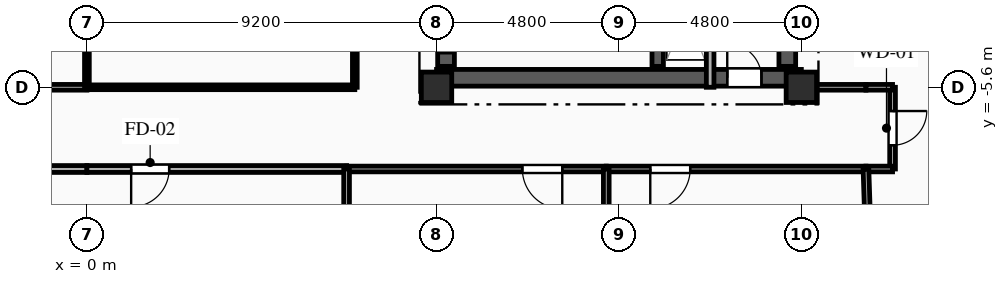
"""IFC4 building model, lengths in metres.
Left out: names, types, materials, properties, quantities, classifications, styles, units other than length and angle.
Written with IfcOpenShell. Run it as: python <this file> out.ifc"""

import sys

from ifc_helpers import new_model, si_unit, direction, frame, frame_2d, origin, origin_2d, place, context, subcontext, project, spatial, rectangle, extrude, element, fill, save


model = new_model("IFC4")
c1 = context("Model", 3, precision=1e-05, world=origin(), true_north=direction((0.0, 1.0)))
c2 = subcontext(c1, "Body", "Model", "MODEL_VIEW")
j1 = project(units=[si_unit("LENGTHUNIT", "METRE"), si_unit("PLANEANGLEUNIT", "RADIAN")], contexts=[c1])
p1 = place(None, origin())
s1 = spatial("IfcSite", under=j1, at=p1, CompositionType="ELEMENT")
p2 = place(p1, origin())
s2 = spatial("IfcBuilding", under=s1, at=p2, CompositionType="ELEMENT")
p3 = place(p2, frame((0.0, 0.0, 235.0)))
s3 = spatial("IfcBuildingStorey", under=s2, at=p3, CompositionType="ELEMENT", Elevation=235.0)
for number, where, z_axis, x_axis in (
    (1, (9.2, -5.6, 0.0), (0.0, 0.0, 1.0), (1.0, 0.0, 0.0)),
    (2, (18.8, -5.6, 0.0), (0.0, 0.0, 1.0), (1.0, 0.0, 0.0)),
):
    element("IfcColumn", number, at=place(p3, frame(where, z_axis=z_axis, x_axis=x_axis)), inside=s3, PredefinedType="COLUMN", context=c2, shape_type="SweptSolid", body=[
        extrude(rectangle(XDim=0.8, YDim=0.8, at=origin_2d()), origin(), (0.0, 0.0, 1.0), 3.35),
    ])
p4 = place(p3, frame((9.2, -5.35, 0.0), z_axis=(0.0, 0.0, 1.0), x_axis=(1.0, 0.0, 0.0)))
e3 = element("IfcWall", 3, at=p4, inside=s3, PredefinedType="SHEAR", context=c2, shape_type="SweptSolid", body=[
    extrude(rectangle(XDim=9.6, YDim=0.44, at=frame_2d((4.8, 0.0))), origin(), (0.0, 0.0, 1.0), 3.04),
])
p5 = place(p4, frame((7.65, 0.0, 0.0)))
e4 = element("IfcOpeningElement", 4, at=p5, cuts=e3, PredefinedType="OPENING", context=c2, shape_type="SweptSolid", body=[
    extrude(rectangle(XDim=0.9, YDim=2.1, at=frame_2d((0.45, 1.05))), frame((0.0, 0.23, 0.0), z_axis=(0.0, -1.0, 0.0), x_axis=(1.0, 0.0, 0.0)), (0.0, 0.0, 1.0), 0.46),
])
p6 = place(p3, frame((9.45, -5.05, 0.0), z_axis=(0.0, 0.0, 1.0), x_axis=(0.0, 1.0, 0.0)))
e5 = element("IfcWall", 5, at=p6, inside=s3, PredefinedType="SHEAR", context=c2, shape_type="SweptSolid", body=[
    extrude(rectangle(XDim=10.1, YDim=0.44, at=frame_2d((5.05, 0.0))), origin(), (0.0, 0.0, 1.0), 3.04),
])
p7 = place(p6, frame((7.15, 0.0, 0.0)))
e6 = element("IfcOpeningElement", 6, at=p7, cuts=e5, PredefinedType="OPENING", context=c2, shape_type="SweptSolid", body=[
    extrude(rectangle(XDim=0.9, YDim=2.1, at=frame_2d((0.45, 1.05))), frame((0.0, 0.23, 0.0), z_axis=(0.0, -1.0, 0.0), x_axis=(1.0, 0.0, 0.0)), (0.0, 0.0, 1.0), 0.46),
])
p8 = place(p6, frame((2.4, 0.0, 0.0)))
e7 = element("IfcOpeningElement", 7, at=p8, cuts=e5, PredefinedType="OPENING", context=c2, shape_type="SweptSolid", body=[
    extrude(rectangle(XDim=1.2, YDim=2.15, at=frame_2d((0.6, 1.075))), frame((0.0, 0.23, 0.0), z_axis=(0.0, -1.0, 0.0), x_axis=(1.0, 0.0, 0.0)), (0.0, 0.0, 1.0), 0.46),
])
p9 = place(p6, frame((0.35, 0.0, 0.0)))
e8 = element("IfcOpeningElement", 8, at=p9, cuts=e5, PredefinedType="OPENING", context=c2, shape_type="SweptSolid", body=[
    extrude(rectangle(XDim=0.9, YDim=2.1, at=frame_2d((0.45, 1.05))), frame((0.0, 0.23, 0.0), z_axis=(0.0, -1.0, 0.0), x_axis=(1.0, 0.0, 0.0)), (0.0, 0.0, 1.0), 0.46),
])
p10 = place(p3, frame((18.43, -5.05, 0.0), z_axis=(0.0, 0.0, 1.0), x_axis=(0.0, 1.0, 0.0)))
e9 = element("IfcWall", 9, at=p10, inside=s3, PredefinedType="SHEAR", context=c2, shape_type="SweptSolid", body=[
    extrude(rectangle(XDim=10.1, YDim=0.44, at=frame_2d((5.05, 0.0))), origin(), (0.0, 0.0, 1.0), 3.04),
])
p11 = place(p3, frame((15.02, -5.05, 0.0), z_axis=(0.0, 0.0, 1.0), x_axis=(0.0, 1.0, 0.0)))
e10 = element("IfcWall", 10, at=p11, inside=s3, PredefinedType="SHEAR", context=c2, shape_type="SweptSolid", body=[
    extrude(rectangle(XDim=10.1, YDim=0.3, at=frame_2d((5.05, 0.0))), origin(), (0.0, 0.0, 1.0), 3.04),
])
p12 = place(p3, frame((16.4, -2.11, 0.0), z_axis=(0.0, 0.0, 1.0), x_axis=(0.0, -1.0, 0.0)))
e11 = element("IfcWall", 11, at=p12, inside=s3, PredefinedType="PARTITIONING", context=c2, shape_type="SweptSolid", body=[
    extrude(rectangle(XDim=3.49, YDim=0.2, at=frame_2d((1.745, 0.0))), origin(), (0.0, 0.0, 1.0), 3.04),
])
p13 = place(p3, frame((0.0, -7.75, 0.0), z_axis=(0.0, 0.0, 1.0), x_axis=(-1.0, 0.0, 0.0)))
e12 = element("IfcWall", 12, at=p13, inside=s3, PredefinedType="PARTITIONING", context=c2, shape_type="SweptSolid", body=[
    extrude(rectangle(XDim=4.383, YDim=0.18, at=frame_2d((2.191, 0.0))), origin(), (0.0, 0.0, 1.0), 3.04),
])
p14 = place(p3, frame((-7.05, -5.6, 0.0), z_axis=(0.0, 0.0, 1.0), x_axis=(1.0, 0.0, 0.0)))
e13 = element("IfcWall", 13, at=p14, inside=s3, PredefinedType="PARTITIONING", context=c2, shape_type="SweptSolid", body=[
    extrude(rectangle(XDim=7.05, YDim=0.15, at=frame_2d((3.525, 0.0))), origin(), (0.0, 0.0, 1.0), 2.525),
])
p15 = place(p3, frame((21.2, -5.6, 0.0), z_axis=(0.0, 0.0, 1.0), x_axis=(0.0, -1.0, 0.0)))
e14 = element("IfcWall", 14, at=p15, inside=s3, PredefinedType="PARTITIONING", context=c2, shape_type="SweptSolid", body=[
    extrude(rectangle(XDim=2.15, YDim=0.15, at=frame_2d((1.075, 0.0))), origin(), (0.0, 0.0, 1.0), 3.04),
])
p16 = place(p15, frame((0.625, 0.0, 0.0)))
e15 = element("IfcOpeningElement", 15, at=p16, cuts=e14, PredefinedType="OPENING", context=c2, shape_type="SweptSolid", body=[
    extrude(rectangle(XDim=0.9, YDim=2.1, at=frame_2d((0.45, 1.05))), frame((0.0, 0.085, 0.0), z_axis=(0.0, -1.0, 0.0), x_axis=(1.0, 0.0, 0.0)), (0.0, 0.0, 1.0), 0.17),
])
p17 = place(p3, frame((18.8, -5.6, 0.0), z_axis=(0.0, 0.0, 1.0), x_axis=(1.0, 0.0, 0.0)))
e16 = element("IfcWall", 16, at=p17, inside=s3, PredefinedType="PARTITIONING", context=c2, shape_type="SweptSolid", body=[
    extrude(rectangle(XDim=1.7, YDim=0.15, at=frame_2d((0.85, 0.0))), origin(), (0.0, 0.0, 1.0), 3.04),
])
for number, where, z_axis, x_axis in (
    (17, (20.5, -5.6, 0.0), (0.0, 0.0, 1.0), (1.0, 0.0, 0.0)),
    (18, (21.2, -7.75, 0.0), (0.0, 0.0, 1.0), (-1.0, 0.0, 0.0)),
):
    element("IfcWall", number, at=place(p3, frame(where, z_axis=z_axis, x_axis=x_axis)), inside=s3, PredefinedType="PARTITIONING", context=c2, shape_type="SweptSolid", body=[
        extrude(rectangle(XDim=0.7, YDim=0.15, at=frame_2d((0.35, 0.0))), origin(), (0.0, 0.0, 1.0), 3.04),
    ])
p18 = place(p3, frame((6.833, -7.75, 0.0), z_axis=(0.0, 0.0, 1.0), x_axis=(-1.0, 0.0, 0.0)))
e19 = element("IfcWall", 19, at=p18, inside=s3, PredefinedType="PARTITIONING", context=c2, shape_type="SweptSolid", body=[
    extrude(rectangle(XDim=6.833, YDim=0.18, at=frame_2d((3.417, 0.0))), origin(), (0.0, 0.0, 1.0), 3.04),
])
p19 = place(p18, frame((4.669, 0.0, 0.0)))
e20 = element("IfcOpeningElement", 20, at=p19, cuts=e19, PredefinedType="OPENING", context=c2, shape_type="SweptSolid", body=[
    extrude(rectangle(XDim=1.0, YDim=2.15, at=frame_2d((0.5, 1.075))), frame((0.0, 0.1, 0.0), z_axis=(0.0, -1.0, 0.0), x_axis=(1.0, 0.0, 0.0)), (0.0, 0.0, 1.0), 0.2),
])
p20 = place(p3, frame((13.667, -7.75, 0.0), z_axis=(0.0, 0.0, 1.0), x_axis=(-1.0, 0.0, 0.0)))
e21 = element("IfcWall", 21, at=p20, inside=s3, PredefinedType="PARTITIONING", context=c2, shape_type="SweptSolid", body=[
    extrude(rectangle(XDim=6.833, YDim=0.15, at=frame_2d((3.417, 0.0))), origin(), (0.0, 0.0, 1.0), 3.04),
])
p21 = place(p20, frame((1.158, 0.0, 0.0)))
e22 = element("IfcOpeningElement", 22, at=p21, cuts=e21, PredefinedType="OPENING", context=c2, shape_type="SweptSolid", body=[
    extrude(rectangle(XDim=1.05, YDim=2.15, at=frame_2d((0.525, 1.075))), frame((0.0, 0.085, 0.0), z_axis=(0.0, -1.0, 0.0), x_axis=(1.0, 0.0, 0.0)), (0.0, 0.0, 1.0), 0.17),
])
p22 = place(p3, frame((20.5, -7.75, 0.0), z_axis=(0.0, 0.0, 1.0), x_axis=(-1.0, 0.0, 0.0)))
e23 = element("IfcWall", 23, at=p22, inside=s3, PredefinedType="PARTITIONING", context=c2, shape_type="SweptSolid", body=[
    extrude(rectangle(XDim=6.833, YDim=0.15, at=frame_2d((3.417, 0.0))), origin(), (0.0, 0.0, 1.0), 3.04),
])
p23 = place(p22, frame((4.625, 0.0, 0.0)))
e24 = element("IfcOpeningElement", 24, at=p23, cuts=e23, PredefinedType="OPENING", context=c2, shape_type="SweptSolid", body=[
    extrude(rectangle(XDim=1.05, YDim=2.15, at=frame_2d((0.525, 1.075))), frame((0.0, 0.085, 0.0), z_axis=(0.0, -1.0, 0.0), x_axis=(1.0, 0.0, 0.0)), (0.0, 0.0, 1.0), 0.17),
])
p24 = place(p3, frame((0.0, -5.6, 0.0), z_axis=(0.0, 0.0, 1.0), x_axis=(1.0, 0.0, 0.0)))
e25 = element("IfcWall", 25, at=p24, inside=s3, PredefinedType="PARTITIONING", context=c2, shape_type="SweptSolid", body=[
    extrude(rectangle(XDim=7.05, YDim=0.125, at=frame_2d((3.525, 0.0))), origin(), (0.0, 0.0, 1.0), 2.525),
])
p25 = place(p3, frame((7.05, -5.6, 0.0), z_axis=(0.0, 0.0, 1.0), x_axis=(0.0, 1.0, 0.0)))
e26 = element("IfcWall", 26, at=p25, inside=s3, PredefinedType="PARTITIONING", context=c2, shape_type="SweptSolid", body=[
    extrude(rectangle(XDim=14.1, YDim=0.125, at=frame_2d((7.05, 0.0))), origin(), (0.0, 0.0, 1.0), 3.04),
])
p26 = place(p25, frame((5.076, 0.0, 0.0)))
e27 = element("IfcOpeningElement", 27, at=p26, cuts=e26, PredefinedType="OPENING", context=c2, shape_type="SweptSolid", body=[
    extrude(rectangle(XDim=0.95, YDim=2.1, at=frame_2d((0.475, 1.05))), frame((0.0, 0.073, 0.0), z_axis=(0.0, -1.0, 0.0), x_axis=(1.0, 0.0, 0.0)), (0.0, 0.0, 1.0), 0.145),
])
p27 = place(p3, frame((20.8, -17.0, 0.0), z_axis=(0.0, 0.0, 1.0), x_axis=(-0.032420659042, 0.99947431226, 0.0)))
e28 = element("IfcWall", 28, at=p27, inside=s3, PredefinedType="PARTITIONING", context=c2, shape_type="SweptSolid", body=[
    extrude(rectangle(XDim=9.255, YDim=0.15, at=frame_2d((4.627, 0.0))), origin(), (0.0, 0.0, 1.0), 3.04),
])
p28 = place(p3, frame((6.833, -7.75, 0.0), z_axis=(0.0, 0.0, 1.0), x_axis=(0.0, -1.0, 0.0)))
e29 = element("IfcWall", 29, at=p28, inside=s3, PredefinedType="PARTITIONING", context=c2, shape_type="SweptSolid", body=[
    extrude(rectangle(XDim=10.65, YDim=0.15, at=frame_2d((5.325, 0.0))), origin(), (0.0, 0.0, 1.0), 2.665),
])
p29 = place(p3, frame((13.667, -7.75, 0.0), z_axis=(0.0, 0.0, 1.0), x_axis=(0.0, -1.0, 0.0)))
e30 = element("IfcWall", 30, at=p29, inside=s3, PredefinedType="PARTITIONING", context=c2, shape_type="SweptSolid", body=[
    extrude(rectangle(XDim=10.65, YDim=0.15, at=frame_2d((5.325, 0.0))), origin(), (0.0, 0.0, 1.0), 3.04),
])
p30 = place(p3, frame((0.0, 8.5, 0.0), z_axis=(0.0, 0.0, 1.0), x_axis=(0.0, -1.0, 0.0)))
e31 = element("IfcWall", 31, at=p30, inside=s3, PredefinedType="PARTITIONING", context=c2, shape_type="SweptSolid", body=[
    extrude(rectangle(XDim=14.1, YDim=0.125, at=frame_2d((7.05, 0.0))), origin(), (0.0, 0.0, 1.0), 3.04),
])
p31 = place(p5, origin())
e32 = element("IfcDoor", 32, at=p31, inside=s3, OperationType="SINGLE_SWING_LEFT", PredefinedType="DOOR", context=c2, shape_type="SweptSolid", body=[
    extrude(rectangle(XDim=0.9, YDim=2.1, at=frame_2d((0.45, 1.05))), frame((0.0, 0.025, 0.0), z_axis=(0.0, -1.0, 0.0), x_axis=(1.0, 0.0, 0.0)), (0.0, 0.0, 1.0), 0.05),
])
fill(e4, e32)
p32 = place(p9, origin())
e33 = element("IfcDoor", 33, at=p32, inside=s3, OperationType="SINGLE_SWING_RIGHT", PredefinedType="DOOR", context=c2, shape_type="SweptSolid", body=[
    extrude(rectangle(XDim=0.9, YDim=2.1, at=frame_2d((0.45, 1.05))), frame((0.0, 0.025, 0.0), z_axis=(0.0, -1.0, 0.0), x_axis=(1.0, 0.0, 0.0)), (0.0, 0.0, 1.0), 0.05),
])
fill(e8, e33)
p33 = place(p16, origin())
e34 = element("IfcDoor", 34, at=p33, inside=s3, OperationType="SINGLE_SWING_LEFT", PredefinedType="DOOR", context=c2, shape_type="SweptSolid", body=[
    extrude(rectangle(XDim=0.9, YDim=2.1, at=frame_2d((0.45, 1.05))), frame((0.0, 0.025, 0.0), z_axis=(0.0, -1.0, 0.0), x_axis=(1.0, 0.0, 0.0)), (0.0, 0.0, 1.0), 0.05),
])
fill(e15, e34)
p34 = place(p19, origin())
e35 = element("IfcDoor", 35, at=p34, inside=s3, OperationType="SINGLE_SWING_RIGHT", PredefinedType="DOOR", context=c2, shape_type="SweptSolid", body=[
    extrude(rectangle(XDim=1.0, YDim=2.15, at=frame_2d((0.5, 1.075))), frame((0.0, 0.025, 0.0), z_axis=(0.0, -1.0, 0.0), x_axis=(1.0, 0.0, 0.0)), (0.0, 0.0, 1.0), 0.05),
])
fill(e20, e35)
p35 = place(p21, origin())
e36 = element("IfcDoor", 36, at=p35, inside=s3, OperationType="SINGLE_SWING_LEFT", PredefinedType="DOOR", context=c2, shape_type="SweptSolid", body=[
    extrude(rectangle(XDim=1.05, YDim=2.15, at=frame_2d((0.525, 1.075))), frame((0.0, 0.025, 0.0), z_axis=(0.0, -1.0, 0.0), x_axis=(1.0, 0.0, 0.0)), (0.0, 0.0, 1.0), 0.05),
])
fill(e22, e36)
p36 = place(p23, origin())
e37 = element("IfcDoor", 37, at=p36, inside=s3, OperationType="SINGLE_SWING_RIGHT", PredefinedType="DOOR", context=c2, shape_type="SweptSolid", body=[
    extrude(rectangle(XDim=1.05, YDim=2.15, at=frame_2d((0.525, 1.075))), frame((0.0, 0.025, 0.0), z_axis=(0.0, -1.0, 0.0), x_axis=(1.0, 0.0, 0.0)), (0.0, 0.0, 1.0), 0.05),
])
fill(e24, e37)
save(model, sys.argv[1])
